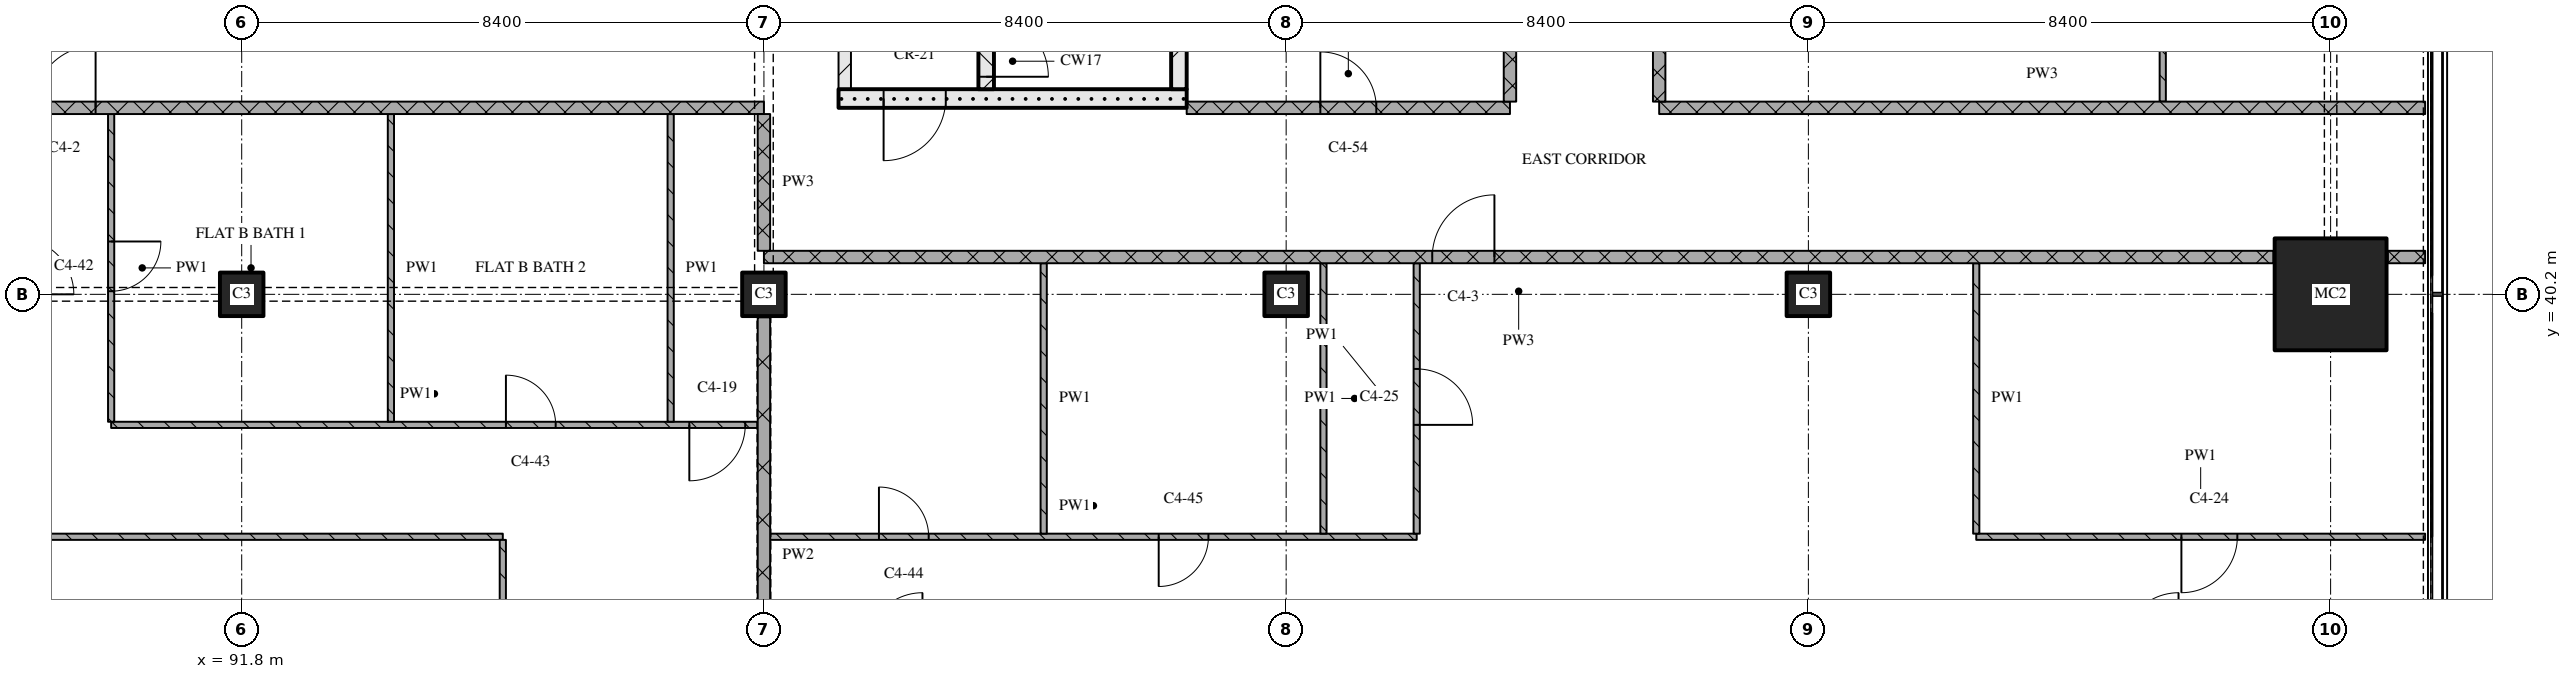
"""IFC4 building model, lengths in metres.
Left out: names, types, materials, properties, quantities, classifications, styles, units other than length and angle.
Written with IfcOpenShell. Run it as: python <this file> out.ifc"""

import sys

from ifc_helpers import new_model, si_unit, direction, frame, frame_2d, origin, origin_2d, place, context, subcontext, project, spatial, rectangle, extrude, element, fill, save


model = new_model("IFC4")
c1 = context("Model", 3, precision=1e-05, world=origin(), true_north=direction((0.0, 1.0)))
c2 = subcontext(c1, "Body", "Model", "MODEL_VIEW")
j1 = project(units=[si_unit("LENGTHUNIT", "METRE"), si_unit("PLANEANGLEUNIT", "RADIAN")], contexts=[c1])
p1 = place(None, origin())
s1 = spatial("IfcSite", under=j1, at=p1, CompositionType="ELEMENT")
p2 = place(p1, origin())
s2 = spatial("IfcBuilding", under=s1, at=p2, CompositionType="ELEMENT")
p3 = place(p2, frame((0.0, 0.0, 183.45)))
s3 = spatial("IfcBuildingStorey", under=s2, at=p3, CompositionType="ELEMENT", Elevation=183.45)
for number, where, z_axis, x_axis in (
    (1, (91.8, 40.2, 0.0), (0.0, 0.0, 1.0), (1.0, 0.0, 0.0)),
    (2, (100.2, 40.2, 0.0), (0.0, 0.0, 1.0), (1.0, 0.0, 0.0)),
    (3, (108.6, 40.2, 0.0), (0.0, 0.0, 1.0), (1.0, 0.0, 0.0)),
    (4, (117.0, 40.2, 0.0), (0.0, 0.0, 1.0), (1.0, 0.0, 0.0)),
):
    element("IfcColumn", number, at=place(p3, frame(where, z_axis=z_axis, x_axis=x_axis)), inside=s3, PredefinedType="COLUMN", context=c2, shape_type="SweptSolid", body=[
        extrude(rectangle(XDim=0.7, YDim=0.7, at=origin_2d()), origin(), (0.0, 0.0, 1.0), 3.6),
    ])
p4 = place(p3, frame((125.4, 40.2, 0.0), z_axis=(0.0, 0.0, 1.0), x_axis=(1.0, 0.0, 0.0)))
e5 = element("IfcColumn", 5, at=p4, inside=s3, PredefinedType="COLUMN", context=c2, shape_type="SweptSolid", body=[
    extrude(rectangle(XDim=1.8, YDim=1.8, at=origin_2d()), origin(), (0.0, 0.0, 1.0), 3.6),
])
p5 = place(p3, frame((101.4, 43.35, 0.0), z_axis=(0.0, 0.0, 1.0), x_axis=(1.0, 0.0, 0.0)))
e6 = element("IfcWall", 6, at=p5, inside=s3, PredefinedType="SOLIDWALL", context=c2, shape_type="SweptSolid", body=[
    extrude(rectangle(XDim=5.6, YDim=0.3, at=frame_2d((2.8, 0.0))), origin(), (0.0, 0.0, 1.0), 3.32),
])
p6 = place(p5, frame((0.725, 0.0, 0.0)))
e7 = element("IfcOpeningElement", 7, at=p6, cuts=e6, PredefinedType="OPENING", context=c2, shape_type="SweptSolid", body=[
    extrude(rectangle(XDim=1.0, YDim=2.1, at=frame_2d((0.5, 1.05))), frame((0.0, 0.16, 0.0), z_axis=(0.0, -1.0, 0.0), x_axis=(1.0, 0.0, 0.0)), (0.0, 0.0, 1.0), 0.32),
])
p7 = place(p3, frame((101.5, 43.5, 0.0), z_axis=(0.0, 0.0, 1.0), x_axis=(0.0, 1.0, 0.0)))
e8 = element("IfcWall", 8, at=p7, inside=s3, PredefinedType="PARTITIONING", context=c2, shape_type="SweptSolid", body=[
    extrude(rectangle(XDim=6.9, YDim=0.2, at=frame_2d((3.45, 0.0))), origin(), (0.0, 0.0, 1.0), 3.32),
])
p8 = place(p7, frame((1.0, 0.0, 0.0)))
e9 = element("IfcOpeningElement", 9, at=p8, cuts=e8, PredefinedType="OPENING", context=c2, shape_type="SweptSolid", body=[
    extrude(rectangle(XDim=1.0, YDim=2.1, at=frame_2d((0.5, 1.05))), frame((0.0, 0.11, 0.0), z_axis=(0.0, -1.0, 0.0), x_axis=(1.0, 0.0, 0.0)), (0.0, 0.0, 1.0), 0.22),
])
p9 = place(p3, frame((103.775, 43.5, 0.0), z_axis=(0.0, 0.0, 1.0), x_axis=(0.0, 1.0, 0.0)))
e10 = element("IfcWall", 10, at=p9, inside=s3, PredefinedType="SOLIDWALL", context=c2, shape_type="SweptSolid", body=[
    extrude(rectangle(XDim=6.9, YDim=0.25, at=frame_2d((3.45, 0.0))), origin(), (0.0, 0.0, 1.0), 3.32),
])
p10 = place(p9, frame((0.2, 0.0, 0.0)))
e11 = element("IfcOpeningElement", 11, at=p10, cuts=e10, PredefinedType="OPENING", context=c2, shape_type="SweptSolid", body=[
    extrude(rectangle(XDim=1.0, YDim=2.1, at=frame_2d((0.5, 1.05))), frame((0.0, 0.135, 0.0), z_axis=(0.0, -1.0, 0.0), x_axis=(1.0, 0.0, 0.0)), (0.0, 0.0, 1.0), 0.27),
])
p11 = place(p3, frame((106.875, 43.5, 0.0), z_axis=(0.0, 0.0, 1.0), x_axis=(0.0, 1.0, 0.0)))
e12 = element("IfcWall", 12, at=p11, inside=s3, PredefinedType="SOLIDWALL", context=c2, shape_type="SweptSolid", body=[
    extrude(rectangle(XDim=6.9, YDim=0.25, at=frame_2d((3.45, 0.0))), origin(), (0.0, 0.0, 1.0), 3.32),
])
p12 = place(p3, frame((96.0, 36.3, 0.0), z_axis=(0.0, 0.0, 1.0), x_axis=(-1.0, 0.0, 0.0)))
e13 = element("IfcWall", 13, at=p12, inside=s3, PredefinedType="PARTITIONING", context=c2, shape_type="SweptSolid", body=[
    extrude(rectangle(XDim=20.9, YDim=0.1, at=frame_2d((10.45, 0.0))), origin(), (0.0, 0.0, 1.0), 3.32),
])
p13 = place(p12, frame((12.15, 0.0, 0.0)))
e14 = element("IfcOpeningElement", 14, at=p13, cuts=e13, PredefinedType="OPENING", context=c2, shape_type="SweptSolid", body=[
    extrude(rectangle(XDim=0.9, YDim=2.1, at=frame_2d((0.45, 1.05))), frame((0.0, 0.06, 0.0), z_axis=(0.0, -1.0, 0.0), x_axis=(1.0, 0.0, 0.0)), (0.0, 0.0, 1.0), 0.12),
])
p14 = place(p12, frame((18.45, 0.0, 0.0)))
e15 = element("IfcOpeningElement", 15, at=p14, cuts=e13, PredefinedType="OPENING", context=c2, shape_type="SweptSolid", body=[
    extrude(rectangle(XDim=0.9, YDim=2.1, at=frame_2d((0.45, 1.05))), frame((0.0, 0.06, 0.0), z_axis=(0.0, -1.0, 0.0), x_axis=(1.0, 0.0, 0.0)), (0.0, 0.0, 1.0), 0.12),
])
p15 = place(p3, frame((100.3, 36.3, 0.0), z_axis=(0.0, 0.0, 1.0), x_axis=(1.0, 0.0, 0.0)))
e16 = element("IfcWall", 16, at=p15, inside=s3, PredefinedType="PARTITIONING", context=c2, shape_type="SweptSolid", body=[
    extrude(rectangle(XDim=10.4, YDim=0.1, at=frame_2d((5.2, 0.0))), origin(), (0.0, 0.0, 1.0), 3.32),
])
p16 = place(p15, frame((1.75, 0.0, 0.0)))
e17 = element("IfcOpeningElement", 17, at=p16, cuts=e16, PredefinedType="OPENING", context=c2, shape_type="SweptSolid", body=[
    extrude(rectangle(XDim=0.8, YDim=2.1, at=frame_2d((0.4, 1.05))), frame((0.0, 0.06, 0.0), z_axis=(0.0, -1.0, 0.0), x_axis=(1.0, 0.0, 0.0)), (0.0, 0.0, 1.0), 0.12),
])
p17 = place(p15, frame((6.25, 0.0, 0.0)))
e18 = element("IfcOpeningElement", 18, at=p17, cuts=e16, PredefinedType="OPENING", context=c2, shape_type="SweptSolid", body=[
    extrude(rectangle(XDim=0.8, YDim=2.1, at=frame_2d((0.4, 1.05))), frame((0.0, 0.06, 0.0), z_axis=(0.0, -1.0, 0.0), x_axis=(1.0, 0.0, 0.0)), (0.0, 0.0, 1.0), 0.12),
])
p18 = place(p3, frame((119.7, 36.3, 0.0), z_axis=(0.0, 0.0, 1.0), x_axis=(1.0, 0.0, 0.0)))
e19 = element("IfcWall", 19, at=p18, inside=s3, PredefinedType="PARTITIONING", context=c2, shape_type="SweptSolid", body=[
    extrude(rectangle(XDim=7.22, YDim=0.1, at=frame_2d((3.61, 0.0))), origin(), (0.0, 0.0, 1.0), 3.32),
])
p19 = place(p18, frame((3.3, 0.0, 0.0)))
e20 = element("IfcOpeningElement", 20, at=p19, cuts=e19, PredefinedType="OPENING", context=c2, shape_type="SweptSolid", body=[
    extrude(rectangle(XDim=0.9, YDim=2.1, at=frame_2d((0.45, 1.05))), frame((0.0, 0.06, 0.0), z_axis=(0.0, -1.0, 0.0), x_axis=(1.0, 0.0, 0.0)), (0.0, 0.0, 1.0), 0.12),
])
p20 = place(p3, frame((89.7, 38.1, 0.0), z_axis=(0.0, 0.0, 1.0), x_axis=(1.0, 0.0, 0.0)))
e21 = element("IfcWall", 21, at=p20, inside=s3, PredefinedType="PARTITIONING", context=c2, shape_type="SweptSolid", body=[
    extrude(rectangle(XDim=10.4, YDim=0.1, at=frame_2d((5.2, 0.0))), origin(), (0.0, 0.0, 1.0), 3.32),
])
p21 = place(p20, frame((6.35, 0.0, 0.0)))
e22 = element("IfcOpeningElement", 22, at=p21, cuts=e21, PredefinedType="OPENING", context=c2, shape_type="SweptSolid", body=[
    extrude(rectangle(XDim=0.8, YDim=2.1, at=frame_2d((0.4, 1.05))), frame((0.0, 0.06, 0.0), z_axis=(0.0, -1.0, 0.0), x_axis=(1.0, 0.0, 0.0)), (0.0, 0.0, 1.0), 0.12),
])
p22 = place(p20, frame((9.3, 0.0, 0.0)))
e23 = element("IfcOpeningElement", 23, at=p22, cuts=e21, PredefinedType="OPENING", context=c2, shape_type="SweptSolid", body=[
    extrude(rectangle(XDim=0.9, YDim=2.1, at=frame_2d((0.45, 1.05))), frame((0.0, 0.06, 0.0), z_axis=(0.0, -1.0, 0.0), x_axis=(1.0, 0.0, 0.0)), (0.0, 0.0, 1.0), 0.12),
])
p23 = place(p3, frame((124.48, 40.8, 0.0), z_axis=(0.0, 0.0, 1.0), x_axis=(-1.0, 0.0, 0.0)))
e24 = element("IfcWall", 24, at=p23, inside=s3, PredefinedType="PARTITIONING", context=c2, shape_type="SweptSolid", body=[
    extrude(rectangle(XDim=24.28, YDim=0.2, at=frame_2d((12.14, 0.0))), origin(), (0.0, 0.0, 1.0), 3.32),
])
p24 = place(p23, frame((12.53, 0.0, 0.0)))
e25 = element("IfcOpeningElement", 25, at=p24, cuts=e24, PredefinedType="OPENING", context=c2, shape_type="SweptSolid", body=[
    extrude(rectangle(XDim=1.0, YDim=2.1, at=frame_2d((0.5, 1.05))), frame((0.0, 0.11, 0.0), z_axis=(0.0, -1.0, 0.0), x_axis=(1.0, 0.0, 0.0)), (0.0, 0.0, 1.0), 0.22),
])
p25 = place(p3, frame((126.32, 40.8, 0.0), z_axis=(0.0, 0.0, 1.0), x_axis=(1.0, 0.0, 0.0)))
e26 = element("IfcWall", 26, at=p25, inside=s3, PredefinedType="PARTITIONING", context=c2, shape_type="SweptSolid", body=[
    extrude(rectangle(XDim=0.6, YDim=0.2, at=frame_2d((0.3, 0.0))), origin(), (0.0, 0.0, 1.0), 3.32),
])
p26 = place(p3, frame((100.2, 43.2, 0.0), z_axis=(0.0, 0.0, 1.0), x_axis=(-1.0, 0.0, 0.0)))
e27 = element("IfcWall", 27, at=p26, inside=s3, PredefinedType="PARTITIONING", context=c2, shape_type="SweptSolid", body=[
    extrude(rectangle(XDim=25.2, YDim=0.2, at=frame_2d((12.6, 0.0))), origin(), (0.0, 0.0, 1.0), 3.32),
])
p27 = place(p26, frame((10.75, 0.0, 0.0)))
e28 = element("IfcOpeningElement", 28, at=p27, cuts=e27, PredefinedType="OPENING", context=c2, shape_type="SweptSolid", body=[
    extrude(rectangle(XDim=1.0, YDim=2.1, at=frame_2d((0.5, 1.05))), frame((0.0, 0.11, 0.0), z_axis=(0.0, -1.0, 0.0), x_axis=(1.0, 0.0, 0.0)), (0.0, 0.0, 1.0), 0.22),
])
p28 = place(p3, frame((107.0, 43.2, 0.0), z_axis=(0.0, 0.0, 1.0), x_axis=(1.0, 0.0, 0.0)))
e29 = element("IfcWall", 29, at=p28, inside=s3, PredefinedType="PARTITIONING", context=c2, shape_type="SweptSolid", body=[
    extrude(rectangle(XDim=5.2, YDim=0.2, at=frame_2d((2.6, 0.0))), origin(), (0.0, 0.0, 1.0), 3.32),
])
p29 = place(p28, frame((2.15, 0.0, 0.0)))
e30 = element("IfcOpeningElement", 30, at=p29, cuts=e29, PredefinedType="OPENING", context=c2, shape_type="SweptSolid", body=[
    extrude(rectangle(XDim=0.9, YDim=2.1, at=frame_2d((0.45, 1.05))), frame((0.0, 0.11, 0.0), z_axis=(0.0, -1.0, 0.0), x_axis=(1.0, 0.0, 0.0)), (0.0, 0.0, 1.0), 0.22),
])
p30 = place(p3, frame((114.6, 43.2, 0.0), z_axis=(0.0, 0.0, 1.0), x_axis=(1.0, 0.0, 0.0)))
e31 = element("IfcWall", 31, at=p30, inside=s3, PredefinedType="PARTITIONING", context=c2, shape_type="SweptSolid", body=[
    extrude(rectangle(XDim=12.32, YDim=0.2, at=frame_2d((6.16, 0.0))), origin(), (0.0, 0.0, 1.0), 3.32),
])
p31 = place(p3, frame((89.7, 43.1, 0.0), z_axis=(0.0, 0.0, 1.0), x_axis=(0.0, -1.0, 0.0)))
e32 = element("IfcWall", 32, at=p31, inside=s3, PredefinedType="PARTITIONING", context=c2, shape_type="SweptSolid", body=[
    extrude(rectangle(XDim=4.95, YDim=0.1, at=frame_2d((2.475, 0.0))), origin(), (0.0, 0.0, 1.0), 3.32),
])
p32 = place(p31, frame((2.05, 0.0, 0.0)))
e33 = element("IfcOpeningElement", 33, at=p32, cuts=e32, PredefinedType="OPENING", context=c2, shape_type="SweptSolid", body=[
    extrude(rectangle(XDim=0.8, YDim=2.1, at=frame_2d((0.4, 1.05))), frame((0.0, 0.06, 0.0), z_axis=(0.0, -1.0, 0.0), x_axis=(1.0, 0.0, 0.0)), (0.0, 0.0, 1.0), 0.12),
])
p33 = place(p3, frame((94.2, 43.1, 0.0), z_axis=(0.0, 0.0, 1.0), x_axis=(0.0, -1.0, 0.0)))
e34 = element("IfcWall", 34, at=p33, inside=s3, PredefinedType="PARTITIONING", context=c2, shape_type="SweptSolid", body=[
    extrude(rectangle(XDim=4.95, YDim=0.1, at=frame_2d((2.475, 0.0))), origin(), (0.0, 0.0, 1.0), 3.32),
])
p34 = place(p3, frame((96.0, 30.28, 0.0), z_axis=(0.0, 0.0, 1.0), x_axis=(0.0, 1.0, 0.0)))
e35 = element("IfcWall", 35, at=p34, inside=s3, PredefinedType="PARTITIONING", context=c2, shape_type="SweptSolid", body=[
    extrude(rectangle(XDim=5.97, YDim=0.1, at=frame_2d((2.985, 0.0))), origin(), (0.0, 0.0, 1.0), 3.32),
])
p35 = place(p34, frame((2.42, 0.0, 0.0)))
e36 = element("IfcOpeningElement", 36, at=p35, cuts=e35, PredefinedType="OPENING", context=c2, shape_type="SweptSolid", body=[
    extrude(rectangle(XDim=0.9, YDim=2.1, at=frame_2d((0.45, 1.05))), frame((0.0, 0.06, 0.0), z_axis=(0.0, -1.0, 0.0), x_axis=(1.0, 0.0, 0.0)), (0.0, 0.0, 1.0), 0.12),
])
p36 = place(p3, frame((98.7, 43.1, 0.0), z_axis=(0.0, 0.0, 1.0), x_axis=(0.0, -1.0, 0.0)))
e37 = element("IfcWall", 37, at=p36, inside=s3, PredefinedType="PARTITIONING", context=c2, shape_type="SweptSolid", body=[
    extrude(rectangle(XDim=4.95, YDim=0.1, at=frame_2d((2.475, 0.0))), origin(), (0.0, 0.0, 1.0), 3.32),
])
p37 = place(p3, frame((100.2, 43.1, 0.0), z_axis=(0.0, 0.0, 1.0), x_axis=(0.0, -1.0, 0.0)))
e38 = element("IfcWall", 38, at=p37, inside=s3, PredefinedType="PARTITIONING", context=c2, shape_type="SweptSolid", body=[
    extrude(rectangle(XDim=2.2, YDim=0.2, at=frame_2d((1.1, 0.0))), origin(), (0.0, 0.0, 1.0), 2.43),
])
p38 = place(p3, frame((100.2, 39.83, 0.0), z_axis=(0.0, 0.0, 1.0), x_axis=(0.0, -1.0, 0.0)))
e39 = element("IfcWall", 39, at=p38, inside=s3, PredefinedType="PARTITIONING", context=c2, shape_type="SweptSolid", body=[
    extrude(rectangle(XDim=7.66, YDim=0.2, at=frame_2d((3.83, 0.0))), origin(), (0.0, 0.0, 1.0), 2.72),
])
for number, where, z_axis, x_axis in (
    (40, (104.7, 40.7, 0.0), (0.0, 0.0, 1.0), (0.0, -1.0, 0.0)),
    (41, (109.2, 40.7, 0.0), (0.0, 0.0, 1.0), (0.0, -1.0, 0.0)),
):
    element("IfcWall", number, at=place(p3, frame(where, z_axis=z_axis, x_axis=x_axis)), inside=s3, PredefinedType="PARTITIONING", context=c2, shape_type="SweptSolid", body=[
        extrude(rectangle(XDim=4.35, YDim=0.1, at=frame_2d((2.175, 0.0))), origin(), (0.0, 0.0, 1.0), 3.32),
    ])
p39 = place(p3, frame((110.7, 36.35, 0.0), z_axis=(0.0, 0.0, 1.0), x_axis=(0.0, 1.0, 0.0)))
e42 = element("IfcWall", 42, at=p39, inside=s3, PredefinedType="PARTITIONING", context=c2, shape_type="SweptSolid", body=[
    extrude(rectangle(XDim=4.35, YDim=0.1, at=frame_2d((2.175, 0.0))), origin(), (0.0, 0.0, 1.0), 3.32),
])
p40 = place(p39, frame((1.75, 0.0, 0.0)))
e43 = element("IfcOpeningElement", 43, at=p40, cuts=e42, PredefinedType="OPENING", context=c2, shape_type="SweptSolid", body=[
    extrude(rectangle(XDim=0.9, YDim=2.1, at=frame_2d((0.45, 1.05))), frame((0.0, 0.06, 0.0), z_axis=(0.0, -1.0, 0.0), x_axis=(1.0, 0.0, 0.0)), (0.0, 0.0, 1.0), 0.12),
])
p41 = place(p3, frame((112.2, 58.7, 0.0), z_axis=(0.0, 0.0, 1.0), x_axis=(0.0, -1.0, 0.0)))
e44 = element("IfcWall", 44, at=p41, inside=s3, PredefinedType="PARTITIONING", context=c2, shape_type="SweptSolid", body=[
    extrude(rectangle(XDim=15.4, YDim=0.2, at=frame_2d((7.7, 0.0))), origin(), (0.0, 0.0, 1.0), 3.32),
])
p42 = place(p3, frame((114.6, 61.1, 0.0), z_axis=(0.0, 0.0, 1.0), x_axis=(0.0, -1.0, 0.0)))
e45 = element("IfcWall", 45, at=p42, inside=s3, PredefinedType="PARTITIONING", context=c2, shape_type="SweptSolid", body=[
    extrude(rectangle(XDim=17.8, YDim=0.2, at=frame_2d((8.9, 0.0))), origin(), (0.0, 0.0, 1.0), 3.32),
])
p43 = place(p42, frame((6.15, 0.0, 0.0)))
e46 = element("IfcOpeningElement", 46, at=p43, cuts=e45, PredefinedType="OPENING", context=c2, shape_type="SweptSolid", body=[
    extrude(rectangle(XDim=1.0, YDim=2.1, at=frame_2d((0.5, 1.05))), frame((0.0, 0.11, 0.0), z_axis=(0.0, -1.0, 0.0), x_axis=(1.0, 0.0, 0.0)), (0.0, 0.0, 1.0), 0.22),
])
p44 = place(p3, frame((119.7, 40.7, 0.0), z_axis=(0.0, 0.0, 1.0), x_axis=(0.0, -1.0, 0.0)))
e47 = element("IfcWall", 47, at=p44, inside=s3, PredefinedType="PARTITIONING", context=c2, shape_type="SweptSolid", body=[
    extrude(rectangle(XDim=4.35, YDim=0.1, at=frame_2d((2.175, 0.0))), origin(), (0.0, 0.0, 1.0), 3.32),
])
p45 = place(p3, frame((122.7, 48.55, 0.0), z_axis=(0.0, 0.0, 1.0), x_axis=(0.0, -1.0, 0.0)))
e48 = element("IfcWall", 48, at=p45, inside=s3, PredefinedType="PARTITIONING", context=c2, shape_type="SweptSolid", body=[
    extrude(rectangle(XDim=5.25, YDim=0.1, at=frame_2d((2.625, 0.0))), origin(), (0.0, 0.0, 1.0), 3.32),
])
p46 = place(p6, origin())
e49 = element("IfcDoor", 49, at=p46, inside=s3, OperationType="SINGLE_SWING_RIGHT", PredefinedType="DOOR", context=c2, shape_type="SweptSolid", body=[
    extrude(rectangle(XDim=1.0, YDim=2.1, at=frame_2d((0.5, 1.05))), frame((0.0, 0.025, 0.0), z_axis=(0.0, -1.0, 0.0), x_axis=(1.0, 0.0, 0.0)), (0.0, 0.0, 1.0), 0.05),
])
fill(e7, e49)
p47 = place(p10, origin())
e50 = element("IfcDoor", 50, at=p47, inside=s3, OperationType="SINGLE_SWING_RIGHT", PredefinedType="DOOR", context=c2, shape_type="SweptSolid", body=[
    extrude(rectangle(XDim=1.0, YDim=2.1, at=frame_2d((0.5, 1.05))), frame((0.0, 0.025, 0.0), z_axis=(0.0, -1.0, 0.0), x_axis=(1.0, 0.0, 0.0)), (0.0, 0.0, 1.0), 0.05),
])
fill(e11, e50)
p48 = place(p16, origin())
e51 = element("IfcDoor", 51, at=p48, inside=s3, OperationType="SINGLE_SWING_LEFT", PredefinedType="DOOR", context=c2, shape_type="SweptSolid", body=[
    extrude(rectangle(XDim=0.8, YDim=2.1, at=frame_2d((0.4, 1.05))), frame((0.0, 0.025, 0.0), z_axis=(0.0, -1.0, 0.0), x_axis=(1.0, 0.0, 0.0)), (0.0, 0.0, 1.0), 0.05),
])
fill(e17, e51)
p49 = place(p17, origin())
e52 = element("IfcDoor", 52, at=p49, inside=s3, OperationType="SINGLE_SWING_RIGHT", PredefinedType="DOOR", context=c2, shape_type="SweptSolid", body=[
    extrude(rectangle(XDim=0.8, YDim=2.1, at=frame_2d((0.4, 1.05))), frame((0.0, 0.025, 0.0), z_axis=(0.0, -1.0, 0.0), x_axis=(1.0, 0.0, 0.0)), (0.0, 0.0, 1.0), 0.05),
])
fill(e18, e52)
p50 = place(p19, origin())
e53 = element("IfcDoor", 53, at=p50, inside=s3, OperationType="SINGLE_SWING_RIGHT", PredefinedType="DOOR", context=c2, shape_type="SweptSolid", body=[
    extrude(rectangle(XDim=0.9, YDim=2.1, at=frame_2d((0.45, 1.05))), frame((0.0, 0.025, 0.0), z_axis=(0.0, -1.0, 0.0), x_axis=(1.0, 0.0, 0.0)), (0.0, 0.0, 1.0), 0.05),
])
fill(e20, e53)
p51 = place(p21, origin())
e54 = element("IfcDoor", 54, at=p51, inside=s3, OperationType="SINGLE_SWING_LEFT", PredefinedType="DOOR", context=c2, shape_type="SweptSolid", body=[
    extrude(rectangle(XDim=0.8, YDim=2.1, at=frame_2d((0.4, 1.05))), frame((0.0, 0.025, 0.0), z_axis=(0.0, -1.0, 0.0), x_axis=(1.0, 0.0, 0.0)), (0.0, 0.0, 1.0), 0.05),
])
fill(e22, e54)
p52 = place(p22, origin())
e55 = element("IfcDoor", 55, at=p52, inside=s3, OperationType="SINGLE_SWING_RIGHT", PredefinedType="DOOR", context=c2, shape_type="SweptSolid", body=[
    extrude(rectangle(XDim=0.9, YDim=2.1, at=frame_2d((0.45, 1.05))), frame((0.0, 0.025, 0.0), z_axis=(0.0, -1.0, 0.0), x_axis=(1.0, 0.0, 0.0)), (0.0, 0.0, 1.0), 0.05),
])
fill(e23, e55)
p53 = place(p24, origin())
e56 = element("IfcDoor", 56, at=p53, inside=s3, OperationType="SINGLE_SWING_RIGHT", PredefinedType="DOOR", context=c2, shape_type="SweptSolid", body=[
    extrude(rectangle(XDim=1.0, YDim=2.1, at=frame_2d((0.5, 1.05))), frame((0.0, 0.025, 0.0), z_axis=(0.0, -1.0, 0.0), x_axis=(1.0, 0.0, 0.0)), (0.0, 0.0, 1.0), 0.05),
])
fill(e25, e56)
p54 = place(p27, origin())
e57 = element("IfcDoor", 57, at=p54, inside=s3, OperationType="SINGLE_SWING_RIGHT", PredefinedType="DOOR", context=c2, shape_type="SweptSolid", body=[
    extrude(rectangle(XDim=1.0, YDim=2.1, at=frame_2d((0.5, 1.05))), frame((0.0, 0.025, 0.0), z_axis=(0.0, -1.0, 0.0), x_axis=(1.0, 0.0, 0.0)), (0.0, 0.0, 1.0), 0.05),
])
fill(e28, e57)
p55 = place(p29, origin())
e58 = element("IfcDoor", 58, at=p55, inside=s3, OperationType="SINGLE_SWING_LEFT", PredefinedType="DOOR", context=c2, shape_type="SweptSolid", body=[
    extrude(rectangle(XDim=0.9, YDim=2.1, at=frame_2d((0.45, 1.05))), frame((0.0, 0.025, 0.0), z_axis=(0.0, -1.0, 0.0), x_axis=(1.0, 0.0, 0.0)), (0.0, 0.0, 1.0), 0.05),
])
fill(e30, e58)
p56 = place(p32, origin())
e59 = element("IfcDoor", 59, at=p56, inside=s3, OperationType="SINGLE_SWING_LEFT", PredefinedType="DOOR", context=c2, shape_type="SweptSolid", body=[
    extrude(rectangle(XDim=0.8, YDim=2.1, at=frame_2d((0.4, 1.05))), frame((0.0, 0.025, 0.0), z_axis=(0.0, -1.0, 0.0), x_axis=(1.0, 0.0, 0.0)), (0.0, 0.0, 1.0), 0.05),
])
fill(e33, e59)
p57 = place(p40, origin())
e60 = element("IfcDoor", 60, at=p57, inside=s3, OperationType="SINGLE_SWING_RIGHT", PredefinedType="DOOR", context=c2, shape_type="SweptSolid", body=[
    extrude(rectangle(XDim=0.9, YDim=2.1, at=frame_2d((0.45, 1.05))), frame((0.0, 0.025, 0.0), z_axis=(0.0, -1.0, 0.0), x_axis=(1.0, 0.0, 0.0)), (0.0, 0.0, 1.0), 0.05),
])
fill(e43, e60)
save(model, sys.argv[1])
